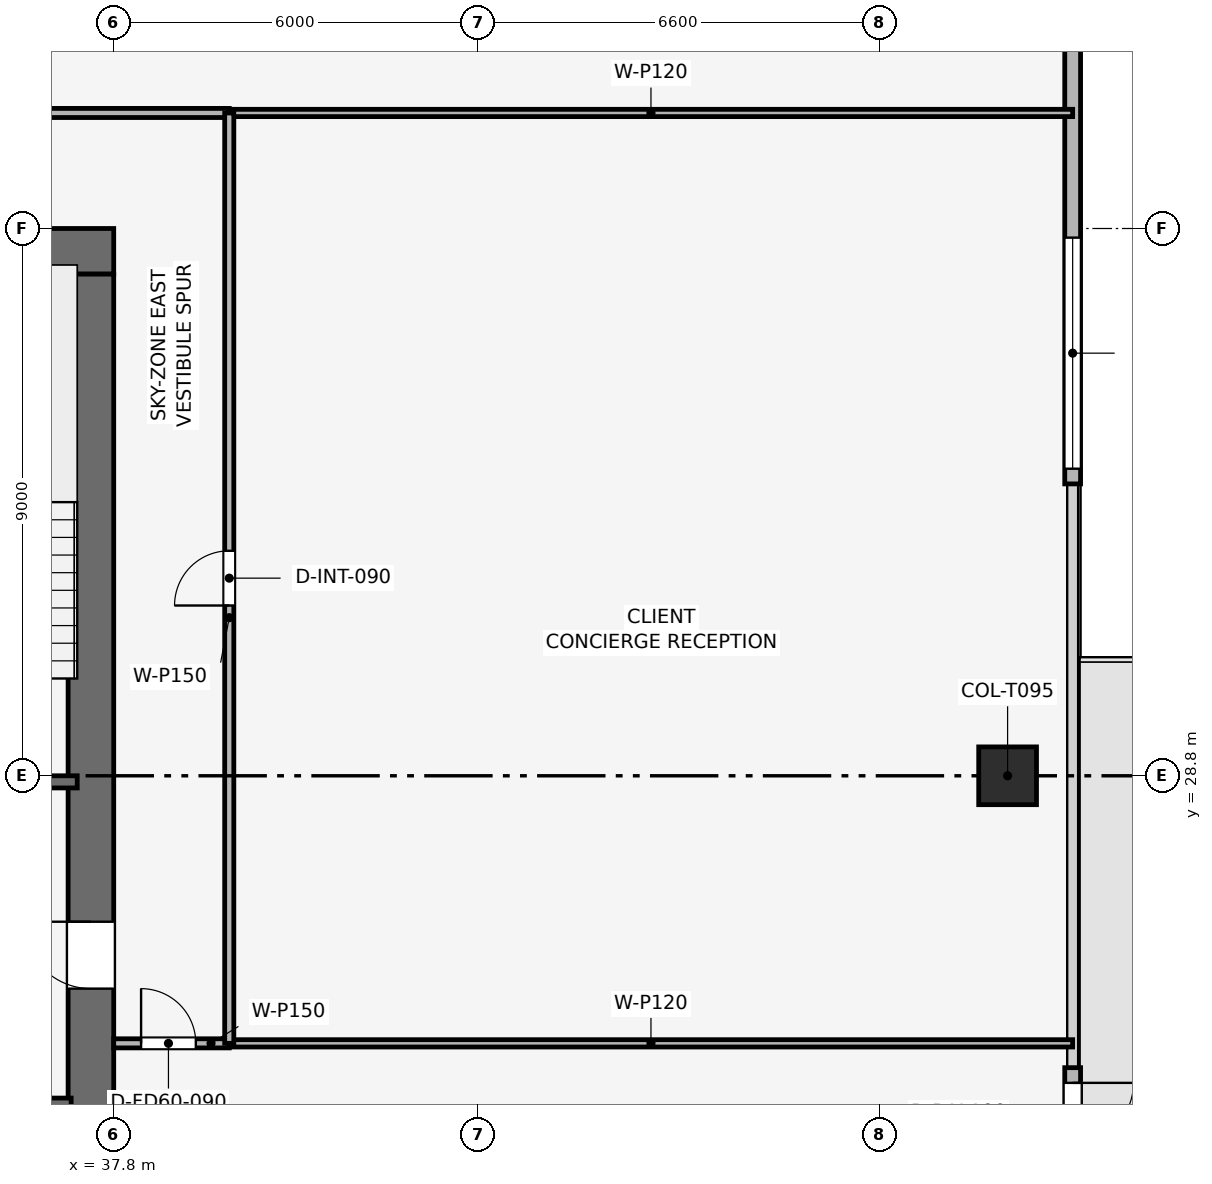
"""IFC4 building model, lengths in metres.
Left out: names, types, materials, properties, quantities, classifications, styles, units other than length and angle.
Written with IfcOpenShell. Run it as: python <this file> out.ifc"""

import sys

from ifc_helpers import new_model, si_unit, direction, frame, frame_2d, origin, origin_2d, place, context, subcontext, project, spatial, rectangle, extrude, element, fill, save


model = new_model("IFC4")
c1 = context("Model", 3, precision=1e-05, world=origin(), true_north=direction((0.0, 1.0)))
c2 = subcontext(c1, "Body", "Model", "MODEL_VIEW")
j1 = project(units=[si_unit("LENGTHUNIT", "METRE"), si_unit("PLANEANGLEUNIT", "RADIAN")], contexts=[c1])
p1 = place(None, origin())
s1 = spatial("IfcSite", under=j1, at=p1, CompositionType="ELEMENT")
p2 = place(p1, origin())
s2 = spatial("IfcBuilding", under=s1, at=p2, CompositionType="ELEMENT")
p3 = place(p2, frame((0.0, 0.0, 276.6)))
s3 = spatial("IfcBuildingStorey", under=s2, at=p3, CompositionType="ELEMENT", Elevation=276.6)
p4 = place(p3, frame((19.8, 37.425, 0.0), z_axis=(0.0, 0.0, 1.0), x_axis=(1.0, 0.0, 0.0)))
e1 = element("IfcWall", 1, at=p4, inside=s3, PredefinedType="SHEAR", context=c2, shape_type="SweptSolid", body=[
    extrude(rectangle(XDim=18.0, YDim=0.75, at=frame_2d((9.0, 0.0))), origin(), (0.0, 0.0, 1.0), 3.75),
])
p5 = place(p4, frame((7.05, 0.0, 0.0)))
e2 = element("IfcOpeningElement", 2, at=p5, cuts=e1, PredefinedType="OPENING", context=c2, shape_type="SweptSolid", body=[
    extrude(rectangle(XDim=1.1, YDim=2.15, at=frame_2d((0.55, 1.075))), frame((0.0, 0.385, 0.0), z_axis=(0.0, -1.0, 0.0), x_axis=(1.0, 0.0, 0.0)), (0.0, 0.0, 1.0), 0.77),
])
p6 = place(p3, frame((37.425, 20.55, 0.0), z_axis=(0.0, 0.0, 1.0), x_axis=(0.0, 1.0, 0.0)))
e3 = element("IfcWall", 3, at=p6, inside=s3, PredefinedType="SHEAR", context=c2, shape_type="SweptSolid", body=[
    extrude(rectangle(XDim=16.5, YDim=0.75, at=frame_2d((8.25, 0.0))), origin(), (0.0, 0.0, 1.0), 3.75),
])
p7 = place(p6, frame((4.75, 0.0, 0.0)))
e4 = element("IfcOpeningElement", 4, at=p7, cuts=e3, PredefinedType="OPENING", context=c2, shape_type="SweptSolid", body=[
    extrude(rectangle(XDim=1.1, YDim=2.15, at=frame_2d((0.55, 1.075))), frame((0.0, 0.385, 0.0), z_axis=(0.0, -1.0, 0.0), x_axis=(1.0, 0.0, 0.0)), (0.0, 0.0, 1.0), 0.77),
])
p8 = place(p3, frame((52.5, 28.8, 0.003), z_axis=(0.0, 0.0, 1.0), x_axis=(1.0, 0.0, 0.0)))
e5 = element("IfcColumn", 5, at=p8, inside=s3, PredefinedType="COLUMN", context=c2, shape_type="SweptSolid", body=[
    extrude(rectangle(XDim=0.95, YDim=0.95, at=origin_2d()), origin(), (0.0, 0.0, 1.0), 3.494),
])
p9 = place(p3, frame((53.57, 46.8, 0.0), z_axis=(0.0, 0.0, 1.0), x_axis=(0.0, -1.0, 0.0)))
e6 = element("IfcWall", 6, at=p9, inside=s3, PredefinedType="SOLIDWALL", context=c2, shape_type="SweptSolid", body=[
    extrude(rectangle(XDim=13.2, YDim=0.26, at=frame_2d((6.6, 0.0))), origin(), (0.0, 0.0, 1.0), 3.5),
])
p10 = place(p9, frame((9.15, 0.0, 0.9)))
e7 = element("IfcOpeningElement", 7, at=p10, cuts=e6, PredefinedType="OPENING", context=c2, shape_type="SweptSolid", body=[
    extrude(rectangle(XDim=3.8, YDim=1.9, at=frame_2d((1.9, 0.95))), frame((0.0, 0.14, 0.0), z_axis=(0.0, -1.0, 0.0), x_axis=(1.0, 0.0, 0.0)), (0.0, 0.0, 1.0), 0.28),
])
p11 = place(p3, frame((53.57, 24.0, 0.0), z_axis=(0.0, 0.0, 1.0), x_axis=(0.0, -1.0, 0.0)))
e8 = element("IfcWall", 8, at=p11, inside=s3, PredefinedType="SOLIDWALL", context=c2, shape_type="SweptSolid", body=[
    extrude(rectangle(XDim=13.2, YDim=0.26, at=frame_2d((6.6, 0.0))), origin(), (0.0, 0.0, 1.0), 3.5),
])
p12 = place(p11, frame((0.25, 0.0, 0.0)))
e9 = element("IfcOpeningElement", 9, at=p12, cuts=e8, PredefinedType="OPENING", context=c2, shape_type="SweptSolid", body=[
    extrude(rectangle(XDim=1.0, YDim=2.2, at=frame_2d((0.5, 1.1))), frame((0.0, 0.14, 0.0), z_axis=(0.0, -1.0, 0.0), x_axis=(1.0, 0.0, 0.0)), (0.0, 0.0, 1.0), 0.28),
])
p13 = place(p3, frame((34.05, 28.7, 0.0), z_axis=(0.0, 0.0, 1.0), x_axis=(1.0, 0.0, 0.0)))
e10 = element("IfcWall", 10, at=p13, inside=s3, PredefinedType="SHEAR", context=c2, shape_type="SweptSolid", body=[
    extrude(rectangle(XDim=3.15, YDim=0.2, at=frame_2d((1.575, 0.0))), origin(), (0.0, 0.0, 1.0), 3.5),
])
p14 = place(p13, frame((0.8, 0.0, 0.0)))
e11 = element("IfcOpeningElement", 11, at=p14, cuts=e10, PredefinedType="OPENING", context=c2, shape_type="SweptSolid", body=[
    extrude(rectangle(XDim=1.0, YDim=2.1, at=frame_2d((0.5, 1.05))), frame((0.0, 0.11, 0.0), z_axis=(0.0, -1.0, 0.0), x_axis=(1.0, 0.0, 0.0)), (0.0, 0.0, 1.0), 0.22),
])
p15 = place(p3, frame((34.05, 23.4, 0.0), z_axis=(0.0, 0.0, 1.0), x_axis=(1.0, 0.0, 0.0)))
e12 = element("IfcWall", 12, at=p15, inside=s3, PredefinedType="SHEAR", context=c2, shape_type="SweptSolid", body=[
    extrude(rectangle(XDim=3.05, YDim=0.2, at=frame_2d((1.525, 0.0))), origin(), (0.0, 0.0, 1.0), 3.5),
])
p16 = place(p15, frame((1.2, 0.0, 0.0)))
e13 = element("IfcOpeningElement", 13, at=p16, cuts=e12, PredefinedType="OPENING", context=c2, shape_type="SweptSolid", body=[
    extrude(rectangle(XDim=1.1, YDim=2.15, at=frame_2d((0.55, 1.075))), frame((0.0, 0.11, 0.0), z_axis=(0.0, -1.0, 0.0), x_axis=(1.0, 0.0, 0.0)), (0.0, 0.0, 1.0), 0.22),
])
p17 = place(p3, frame((37.8, 24.4, 0.0), z_axis=(0.0, 0.0, 1.0), x_axis=(1.0, 0.0, 0.0)))
e14 = element("IfcWall", 14, at=p17, inside=s3, PredefinedType="PARTITIONING", context=c2, shape_type="SweptSolid", body=[
    extrude(rectangle(XDim=1.9, YDim=0.15, at=frame_2d((0.95, 0.0))), origin(), (0.0, 0.0, 1.0), 3.5),
])
p18 = place(p17, frame((0.45, 0.0, 0.0)))
e15 = element("IfcOpeningElement", 15, at=p18, cuts=e14, PredefinedType="OPENING", context=c2, shape_type="SweptSolid", body=[
    extrude(rectangle(XDim=0.9, YDim=2.1, at=frame_2d((0.45, 1.05))), frame((0.0, 0.085, 0.0), z_axis=(0.0, -1.0, 0.0), x_axis=(1.0, 0.0, 0.0)), (0.0, 0.0, 1.0), 0.17),
])
for number, where, z_axis, x_axis in (
    (16, (39.7, 24.4, 0.0), (0.0, 0.0, 1.0), (1.0, 0.0, 0.0)),
    (17, (39.7, 39.7, 0.0), (0.0, 0.0, 1.0), (1.0, 0.0, 0.0)),
):
    element("IfcWall", number, at=place(p3, frame(where, z_axis=z_axis, x_axis=x_axis)), inside=s3, PredefinedType="PARTITIONING", context=c2, shape_type="SweptSolid", body=[
        extrude(rectangle(XDim=13.87, YDim=0.12, at=frame_2d((6.935, 0.0))), origin(), (0.0, 0.0, 1.0), 3.085),
    ])
p19 = place(p3, frame((17.9, 39.7, 0.0), z_axis=(0.0, 0.0, 1.0), x_axis=(1.0, 0.0, 0.0)))
e18 = element("IfcWall", 18, at=p19, inside=s3, PredefinedType="PARTITIONING", context=c2, shape_type="SweptSolid", body=[
    extrude(rectangle(XDim=21.8, YDim=0.15, at=frame_2d((10.9, 0.0))), origin(), (0.0, 0.0, 1.0), 3.085),
])
p20 = place(p19, frame((10.45, 0.0, 0.0)))
e19 = element("IfcOpeningElement", 19, at=p20, cuts=e18, PredefinedType="OPENING", context=c2, shape_type="SweptSolid", body=[
    extrude(rectangle(XDim=0.9, YDim=2.1, at=frame_2d((0.45, 1.05))), frame((0.0, 0.085, 0.0), z_axis=(0.0, -1.0, 0.0), x_axis=(1.0, 0.0, 0.0)), (0.0, 0.0, 1.0), 0.17),
])
p21 = place(p3, frame((39.7, 24.4, 0.0), z_axis=(0.0, 0.0, 1.0), x_axis=(0.0, 1.0, 0.0)))
e20 = element("IfcWall", 20, at=p21, inside=s3, PredefinedType="PARTITIONING", context=c2, shape_type="SweptSolid", body=[
    extrude(rectangle(XDim=15.3, YDim=0.15, at=frame_2d((7.65, 0.0))), origin(), (0.0, 0.0, 1.0), 3.085),
])
p22 = place(p21, frame((7.2, 0.0, 0.0)))
e21 = element("IfcOpeningElement", 21, at=p22, cuts=e20, PredefinedType="OPENING", context=c2, shape_type="SweptSolid", body=[
    extrude(rectangle(XDim=0.9, YDim=2.1, at=frame_2d((0.45, 1.05))), frame((0.0, 0.085, 0.0), z_axis=(0.0, -1.0, 0.0), x_axis=(1.0, 0.0, 0.0)), (0.0, 0.0, 1.0), 0.17),
])
p23 = place(p12, origin())
e22 = element("IfcDoor", 22, at=p23, inside=s3, OperationType="SINGLE_SWING_LEFT", PredefinedType="DOOR", context=c2, shape_type="SweptSolid", body=[
    extrude(rectangle(XDim=1.0, YDim=2.2, at=frame_2d((0.5, 1.1))), frame((0.0, 0.025, 0.0), z_axis=(0.0, -1.0, 0.0), x_axis=(1.0, 0.0, 0.0)), (0.0, 0.0, 1.0), 0.05),
])
fill(e9, e22)
p24 = place(p10, origin())
e23 = element("IfcWindow", 23, at=p24, inside=s3, PartitioningType="SINGLE_PANEL", PredefinedType="WINDOW", context=c2, shape_type="SweptSolid", body=[
    extrude(rectangle(XDim=3.8, YDim=1.9, at=frame_2d((1.9, 0.95))), frame((0.0, 0.03, 0.0), z_axis=(0.0, -1.0, 0.0), x_axis=(1.0, 0.0, 0.0)), (0.0, 0.0, 1.0), 0.06),
])
fill(e7, e23)
p25 = place(p18, origin())
e24 = element("IfcDoor", 24, at=p25, inside=s3, OperationType="SINGLE_SWING_LEFT", PredefinedType="DOOR", context=c2, shape_type="SweptSolid", body=[
    extrude(rectangle(XDim=0.9, YDim=2.1, at=frame_2d((0.45, 1.05))), frame((0.0, 0.025, 0.0), z_axis=(0.0, -1.0, 0.0), x_axis=(1.0, 0.0, 0.0)), (0.0, 0.0, 1.0), 0.05),
])
fill(e15, e24)
p26 = place(p22, origin())
e25 = element("IfcDoor", 25, at=p26, inside=s3, OperationType="SINGLE_SWING_LEFT", PredefinedType="DOOR", context=c2, shape_type="SweptSolid", body=[
    extrude(rectangle(XDim=0.9, YDim=2.1, at=frame_2d((0.45, 1.05))), frame((0.0, 0.025, 0.0), z_axis=(0.0, -1.0, 0.0), x_axis=(1.0, 0.0, 0.0)), (0.0, 0.0, 1.0), 0.05),
])
fill(e21, e25)
p27 = place(p7, origin())
e26 = element("IfcDoor", 26, at=p27, inside=s3, OperationType="SINGLE_SWING_RIGHT", PredefinedType="DOOR", context=c2, shape_type="SweptSolid", body=[
    extrude(rectangle(XDim=1.1, YDim=2.15, at=frame_2d((0.55, 1.075))), frame((0.0, 0.025, 0.0), z_axis=(0.0, -1.0, 0.0), x_axis=(1.0, 0.0, 0.0)), (0.0, 0.0, 1.0), 0.05),
])
fill(e4, e26)
save(model, sys.argv[1])
